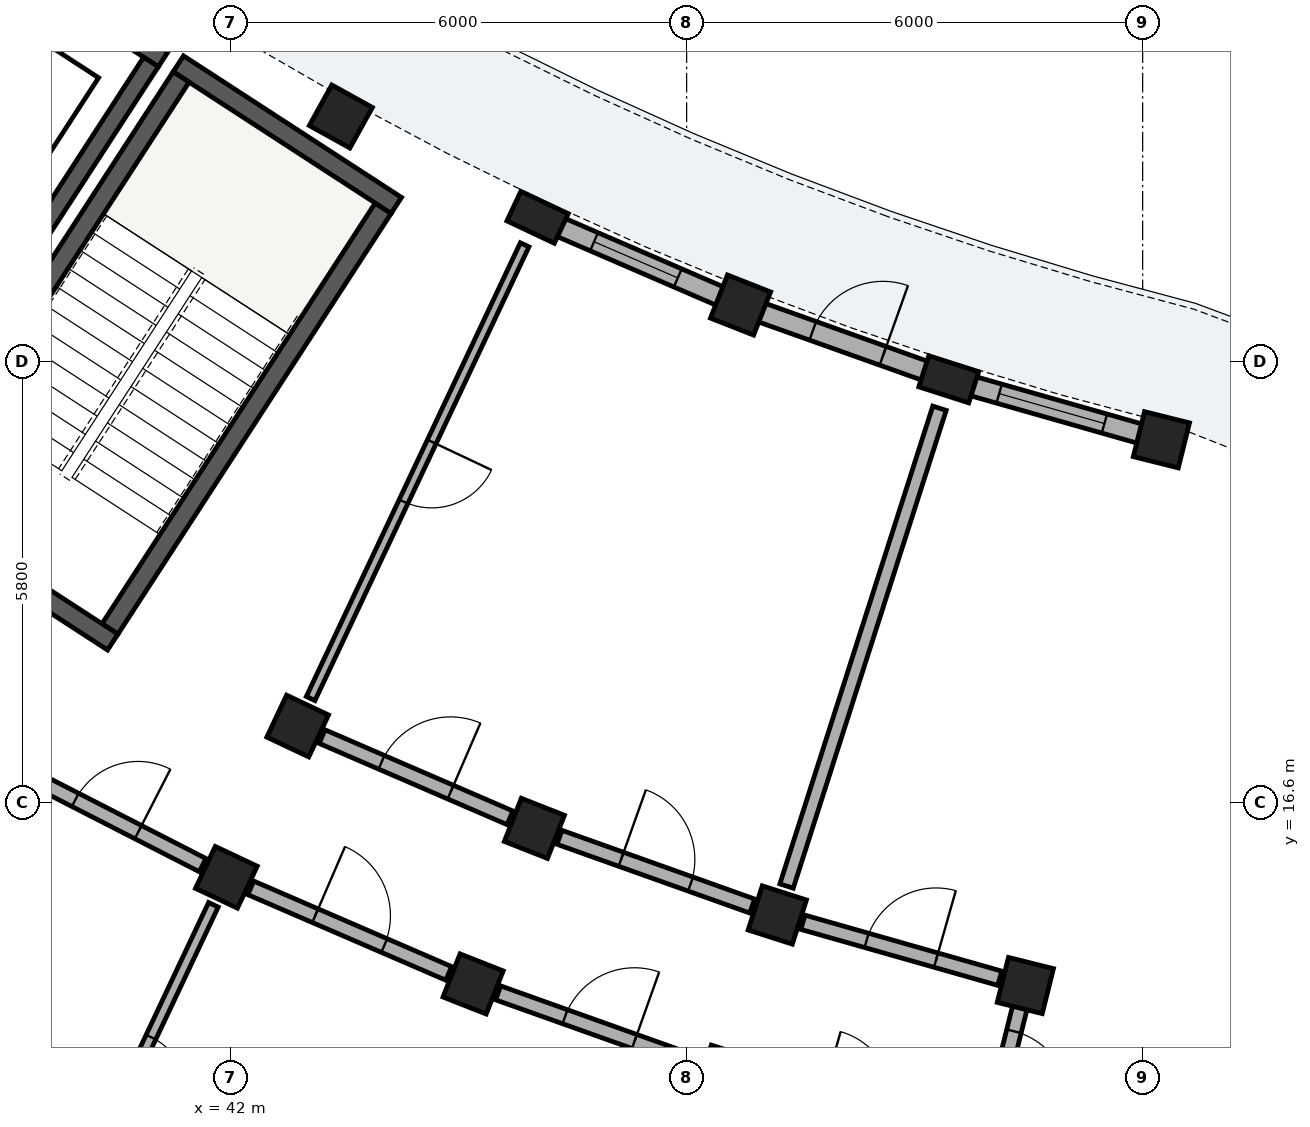
"""IFC4 building model, lengths in metres.
Left out: names, types, materials, properties, quantities, classifications, styles, units other than length and angle.
Written with IfcOpenShell. Run it as: python <this file> out.ifc"""

import sys

from ifc_helpers import new_model, si_unit, direction, frame, frame_2d, origin, origin_2d, place, context, subcontext, project, spatial, rectangle, extrude, element, fill, save


model = new_model("IFC4")
c1 = context("Model", 3, precision=1e-05, world=origin(), true_north=direction((0.0, 1.0)))
c2 = subcontext(c1, "Body", "Model", "MODEL_VIEW")
j1 = project(units=[si_unit("LENGTHUNIT", "METRE"), si_unit("PLANEANGLEUNIT", "RADIAN")], contexts=[c1])
p1 = place(None, origin())
s1 = spatial("IfcSite", under=j1, at=p1, CompositionType="ELEMENT")
p2 = place(p1, origin())
s2 = spatial("IfcBuilding", under=s1, at=p2, CompositionType="ELEMENT")
p3 = place(p2, frame((0.0, 0.0, 4.76)))
s3 = spatial("IfcBuildingStorey", under=s2, at=p3, CompositionType="ELEMENT", Elevation=4.76)
p4 = place(p3, frame((40.413, 18.882, 0.0), z_axis=(0.0, 0.0, 1.0), x_axis=(0.544629435258, 0.838676802022, 0.0)))
e1 = element("IfcWall", 1, at=p4, inside=s3, PredefinedType="SHEAR", context=c2, shape_type="SweptSolid", body=[
    extrude(rectangle(XDim=6.6, YDim=0.25, at=frame_2d((3.3, 0.0))), origin(), (0.0, 0.0, 1.0), 3.83),
])
p5 = place(p3, frame((44.18, 24.454, 0.0), z_axis=(0.0, 0.0, 1.0), x_axis=(-0.838699580527, 0.544594356953, 0.0)))
e2 = element("IfcWall", 2, at=p5, inside=s3, PredefinedType="SHEAR", context=c2, shape_type="SweptSolid", body=[
    extrude(rectangle(XDim=3.42, YDim=0.25, at=frame_2d((1.71, 0.0))), origin(), (0.0, 0.0, 1.0), 3.83),
])
p6 = place(p3, frame((40.449, 18.709, 0.0), z_axis=(0.0, 0.0, 1.0), x_axis=(-0.838678407117, 0.544626963559, 0.0)))
e3 = element("IfcWall", 3, at=p6, inside=s3, PredefinedType="SHEAR", context=c2, shape_type="SweptSolid", body=[
    extrude(rectangle(XDim=3.42, YDim=0.25, at=frame_2d((1.71, 0.0))), origin(), (0.0, 0.0, 1.0), 3.83),
])
p7 = place(p3, frame((37.754, 20.608, 0.0), z_axis=(0.0, 0.0, 1.0), x_axis=(0.544655453679, 0.838659905312, 0.0)))
e4 = element("IfcWall", 4, at=p7, inside=s3, PredefinedType="SHEAR", context=c2, shape_type="SweptSolid", body=[
    extrude(rectangle(XDim=6.6, YDim=0.25, at=frame_2d((3.3, 0.0))), origin(), (0.0, 0.0, 1.0), 3.83),
])
p8 = place(p7, frame((0.22, 0.0, 0.0)))
e5 = element("IfcOpeningElement", 5, at=p8, cuts=e4, PredefinedType="OPENING", context=c2, shape_type="SweptSolid", body=[
    extrude(rectangle(XDim=1.05, YDim=2.15, at=frame_2d((0.525, 1.075))), frame((0.0, 0.135, 0.0), z_axis=(0.0, -1.0, 0.0), x_axis=(1.0, 0.0, 0.0)), (0.0, 0.0, 1.0), 0.27),
])
p9 = place(p3, frame((41.112, 26.375, 0.0), z_axis=(0.0, 0.0, 1.0), x_axis=(-0.838638623546, 0.544688221919, 0.0)))
e6 = element("IfcWall", 6, at=p9, inside=s3, PredefinedType="SHEAR", context=c2, shape_type="SweptSolid", body=[
    extrude(rectangle(XDim=3.26, YDim=0.23, at=frame_2d((1.63, 0.0))), origin(), (0.0, 0.0, 1.0), 3.83),
])
p10 = place(p3, frame((39.482, 24.077, 0.0), z_axis=(0.0, 0.0, 1.0), x_axis=(0.544686387605, 0.838639814913, 0.0)))
e7 = element("IfcWall", 7, at=p10, inside=s3, PredefinedType="SHEAR", context=c2, shape_type="SweptSolid", body=[
    extrude(rectangle(XDim=2.7, YDim=0.23, at=frame_2d((1.35, 0.0))), origin(), (0.0, 0.0, 1.0), 3.83),
])
p11 = place(p3, frame((43.45, 25.623, 0.0), z_axis=(0.0, 0.0, 1.0), x_axis=(-0.484809620246, -0.874619707139, 0.0)))
e8 = element("IfcColumn", 8, at=p11, inside=s3, PredefinedType="COLUMN", context=c2, shape_type="SweptSolid", body=[
    extrude(rectangle(XDim=0.61, YDim=0.61, at=origin_2d()), origin(), (0.0, 0.0, 1.0), 3.825),
])
p12 = place(p3, frame((46.039, 24.297, 0.0), z_axis=(0.0, 0.0, 1.0), x_axis=(-0.426568739901, -0.904455145454, 0.0)))
e9 = element("IfcColumn", 9, at=p12, inside=s3, PredefinedType="PILASTER", context=c2, shape_type="SweptSolid", body=[
    extrude(rectangle(XDim=0.43, YDim=0.69, at=origin_2d()), origin(), (0.0, 0.0, 1.0), 3.825),
])
for number, where, z_axis, x_axis in (
    (10, (42.882, 17.604, 0.0), (0.0, 0.0, 1.0), (-0.427, -0.904, 0.0)),
    (11, (41.944, 15.614, 0.0), (0.0, 0.0, 1.0), (-0.427, -0.904, 0.0)),
    (12, (48.709, 23.143, 0.0), (0.0, 0.0, 1.0), (-0.367, -0.93, 0.0)),
    (13, (45.997, 16.258, 0.0), (0.0, 0.0, 1.0), (-0.367, -0.93, 0.0)),
    (14, (45.191, 14.211, 0.0), (0.0, 0.0, 1.0), (-0.367, -0.93, 0.0)),
):
    element("IfcColumn", number, at=place(p3, frame(where, z_axis=z_axis, x_axis=x_axis)), inside=s3, PredefinedType="COLUMN", context=c2, shape_type="SweptSolid", body=[
        extrude(rectangle(XDim=0.61, YDim=0.61, at=origin_2d()), origin(), (0.0, 0.0, 1.0), 3.825),
    ])
p13 = place(p3, frame((51.449, 22.166, 0.0), z_axis=(0.0, 0.0, 1.0), x_axis=(-0.304864299028, -0.952395799643, 0.0)))
e15 = element("IfcColumn", 15, at=p13, inside=s3, PredefinedType="PILASTER", context=c2, shape_type="SweptSolid", body=[
    extrude(rectangle(XDim=0.43, YDim=0.69, at=origin_2d()), origin(), (0.0, 0.0, 1.0), 3.825),
])
for number, where, z_axis, x_axis in (
    (16, (49.193, 15.118, 0.0), (0.0, 0.0, 1.0), (-0.305, -0.952, 0.0)),
    (17, (48.522, 13.023, 0.0), (0.0, 0.0, 1.0), (-0.305, -0.952, 0.0)),
    (18, (54.247, 21.37, 0.0), (0.0, 0.0, 1.0), (-0.242, -0.97, 0.0)),
    (19, (52.456, 14.19, 0.0), (0.0, 0.0, 1.0), (-0.242, -0.97, 0.0)),
):
    element("IfcColumn", number, at=place(p3, frame(where, z_axis=z_axis, x_axis=x_axis)), inside=s3, PredefinedType="COLUMN", context=c2, shape_type="SweptSolid", body=[
        extrude(rectangle(XDim=0.61, YDim=0.61, at=origin_2d()), origin(), (0.0, 0.0, 1.0), 3.825),
    ])
p14 = place(p3, frame((46.209, 24.224, 0.0), z_axis=(0.0, 0.0, 1.0), x_axis=(0.917908073111, -0.396793106439, 0.0)))
e20 = element("IfcWall", 20, at=p14, inside=s3, PredefinedType="SOLIDWALL", context=c2, shape_type="SweptSolid", body=[
    extrude(rectangle(XDim=2.449, YDim=0.26, at=frame_2d((1.224, 0.0))), origin(), (0.0, 0.0, 1.0), 3.075),
])
p15 = place(p14, frame((0.625, 0.0, 0.55)))
e21 = element("IfcOpeningElement", 21, at=p15, cuts=e20, PredefinedType="OPENING", context=c2, shape_type="SweptSolid", body=[
    extrude(rectangle(XDim=1.2, YDim=1.51, at=frame_2d((0.6, 0.755))), frame((0.0, 0.14, 0.0), z_axis=(0.0, -1.0, 0.0), x_axis=(1.0, 0.0, 0.0)), (0.0, 0.0, 1.0), 0.28),
])
p16 = place(p3, frame((48.968, 23.051, 0.0), z_axis=(0.0, 0.0, 1.0), x_axis=(0.941897456242, -0.335900553623, 0.0)))
e22 = element("IfcWall", 22, at=p16, inside=s3, PredefinedType="SOLIDWALL", context=c2, shape_type="SweptSolid", body=[
    extrude(rectangle(XDim=2.449, YDim=0.26, at=frame_2d((1.224, 0.0))), origin(), (0.0, 0.0, 1.0), 3.075),
])
p17 = place(p16, frame((0.734, 0.0, 0.0)))
e23 = element("IfcOpeningElement", 23, at=p17, cuts=e22, PredefinedType="OPENING", context=c2, shape_type="SweptSolid", body=[
    extrude(rectangle(XDim=0.98, YDim=2.12, at=frame_2d((0.49, 1.06))), frame((0.0, 0.14, 0.0), z_axis=(0.0, -1.0, 0.0), x_axis=(1.0, 0.0, 0.0)), (0.0, 0.0, 1.0), 0.28),
])
p18 = place(p3, frame((51.627, 22.115, 0.0), z_axis=(0.0, 0.0, 1.0), x_axis=(0.961854311059, -0.273562212847, 0.0)))
e24 = element("IfcWall", 24, at=p18, inside=s3, PredefinedType="SOLIDWALL", context=c2, shape_type="SweptSolid", body=[
    extrude(rectangle(XDim=2.449, YDim=0.26, at=frame_2d((1.225, 0.0))), origin(), (0.0, 0.0, 1.0), 3.075),
])
p19 = place(p18, frame((0.504, 0.0, 0.55)))
e25 = element("IfcOpeningElement", 25, at=p19, cuts=e24, PredefinedType="OPENING", context=c2, shape_type="SweptSolid", body=[
    extrude(rectangle(XDim=1.44, YDim=1.66, at=frame_2d((0.72, 0.83))), frame((0.0, 0.14, 0.0), z_axis=(0.0, -1.0, 0.0), x_axis=(1.0, 0.0, 0.0)), (0.0, 0.0, 1.0), 0.28),
])
p20 = place(p3, frame((39.107, 17.067, 0.0), z_axis=(0.0, 0.0, 1.0), x_axis=(0.890030590607, -0.45590080915, 0.0)))
e26 = element("IfcWall", 26, at=p20, inside=s3, PredefinedType="PARTITIONING", context=c2, shape_type="SweptSolid", body=[
    extrude(rectangle(XDim=2.837, YDim=0.195, at=frame_2d((1.418, 0.0))), origin(), (0.0, 0.0, 1.0), 3.09),
])
p21 = place(p20, frame((0.954, 0.0, 0.0)))
e27 = element("IfcOpeningElement", 27, at=p21, cuts=e26, PredefinedType="OPENING", context=c2, shape_type="SweptSolid", body=[
    extrude(rectangle(XDim=0.93, YDim=2.12, at=frame_2d((0.465, 1.06))), frame((0.0, 0.107, 0.0), z_axis=(0.0, -1.0, 0.0), x_axis=(1.0, 0.0, 0.0)), (0.0, 0.0, 1.0), 0.215),
])
p22 = place(p3, frame((41.773, 15.252, 0.0), z_axis=(0.0, 0.0, 1.0), x_axis=(-0.426567365945, -0.904455793453, 0.0)))
e28 = element("IfcWall", 28, at=p22, inside=s3, PredefinedType="PLUMBINGWALL", context=c2, shape_type="SweptSolid", body=[
    extrude(rectangle(XDim=4.7, YDim=0.14, at=frame_2d((2.35, 0.0))), origin(), (0.0, 0.0, 1.0), 3.09),
])
p23 = place(p22, frame((1.925, 0.0, 0.0)))
e29 = element("IfcOpeningElement", 29, at=p23, cuts=e28, PredefinedType="OPENING", context=c2, shape_type="SweptSolid", body=[
    extrude(rectangle(XDim=0.85, YDim=2.05, at=frame_2d((0.425, 1.025))), frame((0.0, 0.08, 0.0), z_axis=(0.0, -1.0, 0.0), x_axis=(1.0, 0.0, 0.0)), (0.0, 0.0, 1.0), 0.16),
])
p24 = place(p3, frame((45.868, 23.935, 0.0), z_axis=(0.0, 0.0, 1.0), x_axis=(-0.426573573579, -0.904452865728, 0.0)))
e30 = element("IfcWall", 30, at=p24, inside=s3, PredefinedType="PARTITIONING", context=c2, shape_type="SweptSolid", body=[
    extrude(rectangle(XDim=6.6, YDim=0.125, at=frame_2d((3.3, 0.0))), origin(), (0.0, 0.0, 1.0), 3.09),
])
p25 = place(p24, frame((2.865, 0.0, 0.0)))
e31 = element("IfcOpeningElement", 31, at=p25, cuts=e30, PredefinedType="OPENING", context=c2, shape_type="SweptSolid", body=[
    extrude(rectangle(XDim=0.87, YDim=2.08, at=frame_2d((0.435, 1.04))), frame((0.0, 0.073, 0.0), z_axis=(0.0, -1.0, 0.0), x_axis=(1.0, 0.0, 0.0)), (0.0, 0.0, 1.0), 0.145),
])
p26 = place(p3, frame((42.265, 15.475, 0.0), z_axis=(0.0, 0.0, 1.0), x_axis=(0.917943439406, -0.396711282991, 0.0)))
e32 = element("IfcWall", 32, at=p26, inside=s3, PredefinedType="PARTITIONING", context=c2, shape_type="SweptSolid", body=[
    extrude(rectangle(XDim=2.837, YDim=0.195, at=frame_2d((1.418, 0.0))), origin(), (0.0, 0.0, 1.0), 3.09),
])
p27 = place(p26, frame((0.924, 0.0, 0.0)))
e33 = element("IfcOpeningElement", 33, at=p27, cuts=e32, PredefinedType="OPENING", context=c2, shape_type="SweptSolid", body=[
    extrude(rectangle(XDim=0.99, YDim=2.16, at=frame_2d((0.495, 1.08))), frame((0.0, 0.107, 0.0), z_axis=(0.0, -1.0, 0.0), x_axis=(1.0, 0.0, 0.0)), (0.0, 0.0, 1.0), 0.215),
])
p28 = place(p3, frame((43.204, 17.465, 0.0), z_axis=(0.0, 0.0, 1.0), x_axis=(0.91793557165, -0.39672948756, 0.0)))
e34 = element("IfcWall", 34, at=p28, inside=s3, PredefinedType="PARTITIONING", context=c2, shape_type="SweptSolid", body=[
    extrude(rectangle(XDim=2.693, YDim=0.195, at=frame_2d((1.346, 0.0))), origin(), (0.0, 0.0, 1.0), 3.09),
])
p29 = place(p28, frame((0.852, 0.0, 0.0)))
e35 = element("IfcOpeningElement", 35, at=p29, cuts=e34, PredefinedType="OPENING", context=c2, shape_type="SweptSolid", body=[
    extrude(rectangle(XDim=0.99, YDim=2.16, at=frame_2d((0.495, 1.08))), frame((0.0, 0.107, 0.0), z_axis=(0.0, -1.0, 0.0), x_axis=(1.0, 0.0, 0.0)), (0.0, 0.0, 1.0), 0.215),
])
p30 = place(p3, frame((45.52, 14.093, 0.0), z_axis=(0.0, 0.0, 1.0), x_axis=(0.941930628611, -0.335807520589, 0.0)))
e36 = element("IfcWall", 36, at=p30, inside=s3, PredefinedType="PARTITIONING", context=c2, shape_type="SweptSolid", body=[
    extrude(rectangle(XDim=2.837, YDim=0.195, at=frame_2d((1.418, 0.0))), origin(), (0.0, 0.0, 1.0), 3.09),
])
p31 = place(p30, frame((0.934, 0.0, 0.0)))
e37 = element("IfcOpeningElement", 37, at=p31, cuts=e36, PredefinedType="OPENING", context=c2, shape_type="SweptSolid", body=[
    extrude(rectangle(XDim=0.97, YDim=2.15, at=frame_2d((0.485, 1.075))), frame((0.0, 0.107, 0.0), z_axis=(0.0, -1.0, 0.0), x_axis=(1.0, 0.0, 0.0)), (0.0, 0.0, 1.0), 0.215),
])
p32 = place(p3, frame((46.327, 16.14, 0.0), z_axis=(0.0, 0.0, 1.0), x_axis=(0.941895652647, -0.335905611036, 0.0)))
e38 = element("IfcWall", 38, at=p32, inside=s3, PredefinedType="PARTITIONING", context=c2, shape_type="SweptSolid", body=[
    extrude(rectangle(XDim=2.693, YDim=0.195, at=frame_2d((1.346, 0.0))), origin(), (0.0, 0.0, 1.0), 3.09),
])
p33 = place(p32, frame((0.862, 0.0, 0.0)))
e39 = element("IfcOpeningElement", 39, at=p33, cuts=e38, PredefinedType="OPENING", context=c2, shape_type="SweptSolid", body=[
    extrude(rectangle(XDim=0.97, YDim=2.15, at=frame_2d((0.485, 1.075))), frame((0.0, 0.107, 0.0), z_axis=(0.0, -1.0, 0.0), x_axis=(1.0, 0.0, 0.0)), (0.0, 0.0, 1.0), 0.215),
])
p34 = place(p3, frame((51.327, 21.785, 0.0), z_axis=(0.0, 0.0, 1.0), x_axis=(-0.304875046605, -0.95239235925, 0.0)))
e40 = element("IfcWall", 40, at=p34, inside=s3, PredefinedType="PARTITIONING", context=c2, shape_type="SweptSolid", body=[
    extrude(rectangle(XDim=6.6, YDim=0.185, at=frame_2d((3.3, 0.0))), origin(), (0.0, 0.0, 1.0), 3.09),
])
p35 = place(p3, frame((49.53, 15.022, 0.0), z_axis=(0.0, 0.0, 1.0), x_axis=(0.961861926514, -0.273535435224, 0.0)))
e41 = element("IfcWall", 41, at=p35, inside=s3, PredefinedType="PARTITIONING", context=c2, shape_type="SweptSolid", body=[
    extrude(rectangle(XDim=2.693, YDim=0.195, at=frame_2d((1.346, 0.0))), origin(), (0.0, 0.0, 1.0), 3.09),
])
p36 = place(p35, frame((0.872, 0.0, 0.0)))
e42 = element("IfcOpeningElement", 42, at=p36, cuts=e41, PredefinedType="OPENING", context=c2, shape_type="SweptSolid", body=[
    extrude(rectangle(XDim=0.95, YDim=2.13, at=frame_2d((0.475, 1.065))), frame((0.0, 0.107, 0.0), z_axis=(0.0, -1.0, 0.0), x_axis=(1.0, 0.0, 0.0)), (0.0, 0.0, 1.0), 0.215),
])
p37 = place(p3, frame((52.444, 14.142, 0.0), z_axis=(0.0, 0.0, 1.0), x_axis=(-0.241933770084, -0.970292765557, 0.0)))
e43 = element("IfcWall", 43, at=p37, inside=s3, PredefinedType="PARTITIONING", context=c2, shape_type="SweptSolid", body=[
    extrude(rectangle(XDim=2.1, YDim=0.195, at=frame_2d((1.05, 0.0))), origin(), (0.0, 0.0, 1.0), 3.09),
])
p38 = place(p37, frame((0.57, 0.0, 0.0)))
e44 = element("IfcOpeningElement", 44, at=p38, cuts=e43, PredefinedType="OPENING", context=c2, shape_type="SweptSolid", body=[
    extrude(rectangle(XDim=0.95, YDim=2.13, at=frame_2d((0.475, 1.065))), frame((0.0, 0.107, 0.0), z_axis=(0.0, -1.0, 0.0), x_axis=(1.0, 0.0, 0.0)), (0.0, 0.0, 1.0), 0.215),
])
p39 = place(p15, origin())
e45 = element("IfcWindow", 45, at=p39, inside=s3, PartitioningType="SINGLE_PANEL", PredefinedType="WINDOW", context=c2, shape_type="SweptSolid", body=[
    extrude(rectangle(XDim=1.2, YDim=1.51, at=frame_2d((0.6, 0.755))), frame((0.0, 0.03, 0.0), z_axis=(0.0, -1.0, 0.0), x_axis=(1.0, 0.0, 0.0)), (0.0, 0.0, 1.0), 0.06),
])
fill(e21, e45)
p40 = place(p17, origin())
e46 = element("IfcDoor", 46, at=p40, inside=s3, OperationType="SINGLE_SWING_RIGHT", PredefinedType="DOOR", context=c2, shape_type="SweptSolid", body=[
    extrude(rectangle(XDim=0.98, YDim=2.12, at=frame_2d((0.49, 1.06))), frame((0.0, 0.025, 0.0), z_axis=(0.0, -1.0, 0.0), x_axis=(1.0, 0.0, 0.0)), (0.0, 0.0, 1.0), 0.05),
])
fill(e23, e46)
p41 = place(p19, origin())
e47 = element("IfcWindow", 47, at=p41, inside=s3, PartitioningType="SINGLE_PANEL", PredefinedType="WINDOW", context=c2, shape_type="SweptSolid", body=[
    extrude(rectangle(XDim=1.44, YDim=1.66, at=frame_2d((0.72, 0.83))), frame((0.0, 0.03, 0.0), z_axis=(0.0, -1.0, 0.0), x_axis=(1.0, 0.0, 0.0)), (0.0, 0.0, 1.0), 0.06),
])
fill(e25, e47)
p42 = place(p21, origin())
e48 = element("IfcDoor", 48, at=p42, inside=s3, OperationType="SINGLE_SWING_RIGHT", PredefinedType="DOOR", context=c2, shape_type="SweptSolid", body=[
    extrude(rectangle(XDim=0.93, YDim=2.12, at=frame_2d((0.465, 1.06))), frame((0.0, 0.025, 0.0), z_axis=(0.0, -1.0, 0.0), x_axis=(1.0, 0.0, 0.0)), (0.0, 0.0, 1.0), 0.05),
])
fill(e27, e48)
p43 = place(p23, origin())
e49 = element("IfcDoor", 49, at=p43, inside=s3, OperationType="SINGLE_SWING_RIGHT", PredefinedType="DOOR", context=c2, shape_type="SweptSolid", body=[
    extrude(rectangle(XDim=0.85, YDim=2.05, at=frame_2d((0.425, 1.025))), frame((0.0, 0.025, 0.0), z_axis=(0.0, -1.0, 0.0), x_axis=(1.0, 0.0, 0.0)), (0.0, 0.0, 1.0), 0.05),
])
fill(e29, e49)
p44 = place(p25, origin())
e50 = element("IfcDoor", 50, at=p44, inside=s3, OperationType="SINGLE_SWING_LEFT", PredefinedType="DOOR", context=c2, shape_type="SweptSolid", body=[
    extrude(rectangle(XDim=0.87, YDim=2.08, at=frame_2d((0.435, 1.04))), frame((0.0, 0.025, 0.0), z_axis=(0.0, -1.0, 0.0), x_axis=(1.0, 0.0, 0.0)), (0.0, 0.0, 1.0), 0.05),
])
fill(e31, e50)
p45 = place(p27, origin())
e51 = element("IfcDoor", 51, at=p45, inside=s3, OperationType="SINGLE_SWING_LEFT", PredefinedType="DOOR", context=c2, shape_type="SweptSolid", body=[
    extrude(rectangle(XDim=0.99, YDim=2.16, at=frame_2d((0.495, 1.08))), frame((0.0, 0.025, 0.0), z_axis=(0.0, -1.0, 0.0), x_axis=(1.0, 0.0, 0.0)), (0.0, 0.0, 1.0), 0.05),
])
fill(e33, e51)
p46 = place(p29, origin())
e52 = element("IfcDoor", 52, at=p46, inside=s3, OperationType="SINGLE_SWING_RIGHT", PredefinedType="DOOR", context=c2, shape_type="SweptSolid", body=[
    extrude(rectangle(XDim=0.99, YDim=2.16, at=frame_2d((0.495, 1.08))), frame((0.0, 0.025, 0.0), z_axis=(0.0, -1.0, 0.0), x_axis=(1.0, 0.0, 0.0)), (0.0, 0.0, 1.0), 0.05),
])
fill(e35, e52)
p47 = place(p31, origin())
e53 = element("IfcDoor", 53, at=p47, inside=s3, OperationType="SINGLE_SWING_RIGHT", PredefinedType="DOOR", context=c2, shape_type="SweptSolid", body=[
    extrude(rectangle(XDim=0.97, YDim=2.15, at=frame_2d((0.485, 1.075))), frame((0.0, 0.025, 0.0), z_axis=(0.0, -1.0, 0.0), x_axis=(1.0, 0.0, 0.0)), (0.0, 0.0, 1.0), 0.05),
])
fill(e37, e53)
p48 = place(p33, origin())
e54 = element("IfcDoor", 54, at=p48, inside=s3, OperationType="SINGLE_SWING_LEFT", PredefinedType="DOOR", context=c2, shape_type="SweptSolid", body=[
    extrude(rectangle(XDim=0.97, YDim=2.15, at=frame_2d((0.485, 1.075))), frame((0.0, 0.025, 0.0), z_axis=(0.0, -1.0, 0.0), x_axis=(1.0, 0.0, 0.0)), (0.0, 0.0, 1.0), 0.05),
])
fill(e39, e54)
p49 = place(p36, origin())
e55 = element("IfcDoor", 55, at=p49, inside=s3, OperationType="SINGLE_SWING_RIGHT", PredefinedType="DOOR", context=c2, shape_type="SweptSolid", body=[
    extrude(rectangle(XDim=0.95, YDim=2.13, at=frame_2d((0.475, 1.065))), frame((0.0, 0.025, 0.0), z_axis=(0.0, -1.0, 0.0), x_axis=(1.0, 0.0, 0.0)), (0.0, 0.0, 1.0), 0.05),
])
fill(e42, e55)
p50 = place(p38, origin())
e56 = element("IfcDoor", 56, at=p50, inside=s3, OperationType="SINGLE_SWING_RIGHT", PredefinedType="DOOR", context=c2, shape_type="SweptSolid", body=[
    extrude(rectangle(XDim=0.95, YDim=2.13, at=frame_2d((0.475, 1.065))), frame((0.0, 0.025, 0.0), z_axis=(0.0, -1.0, 0.0), x_axis=(1.0, 0.0, 0.0)), (0.0, 0.0, 1.0), 0.05),
])
fill(e44, e56)
save(model, sys.argv[1])
